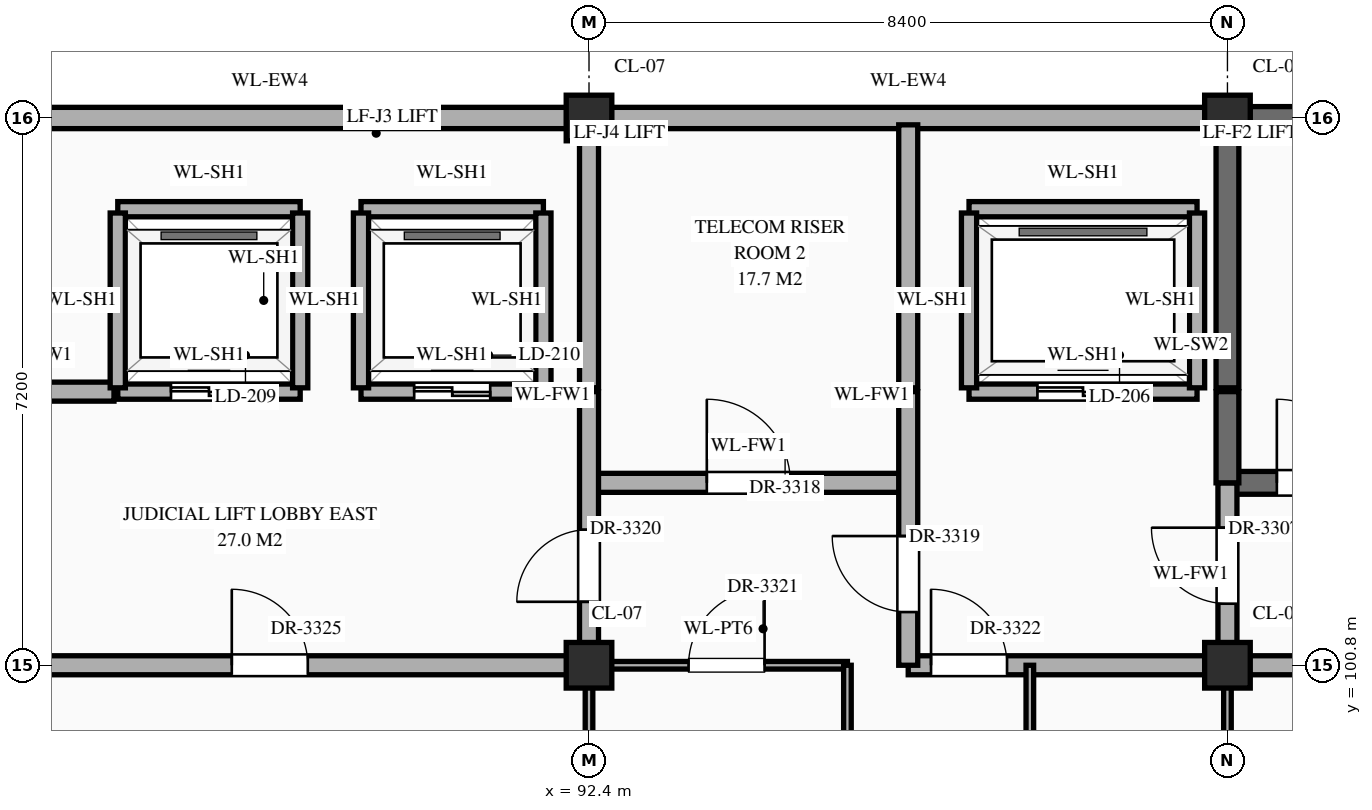
"""IFC4 building model, lengths in metres.
Left out: names, types, materials, properties, quantities, classifications, styles, units other than length and angle.
Written with IfcOpenShell. Run it as: python <this file> out.ifc"""

import sys

from ifc_helpers import new_model, si_unit, direction, frame, frame_2d, origin, origin_2d, place, context, subcontext, project, spatial, rectangle, extrude, element, fill, save


model = new_model("IFC4")
c1 = context("Model", 3, precision=1e-05, world=origin(), true_north=direction((0.0, 1.0)))
c2 = subcontext(c1, "Body", "Model", "MODEL_VIEW")
j1 = project(units=[si_unit("LENGTHUNIT", "METRE"), si_unit("PLANEANGLEUNIT", "RADIAN")], contexts=[c1])
p1 = place(None, origin())
s1 = spatial("IfcSite", under=j1, at=p1, CompositionType="ELEMENT")
p2 = place(p1, origin())
s2 = spatial("IfcBuilding", under=s1, at=p2, CompositionType="ELEMENT")
p3 = place(p2, frame((0.0, 0.0, 64.5)))
s3 = spatial("IfcBuildingStorey", under=s2, at=p3, CompositionType="ELEMENT", Elevation=64.5)
for number, where, z_axis, x_axis in (
    (1, (92.4, 100.8, 0.0), (0.0, 0.0, 1.0), (1.0, 0.0, 0.0)),
    (2, (92.4, 108.0, 0.0), (0.0, 0.0, 1.0), (1.0, 0.0, 0.0)),
    (3, (100.8, 100.8, 0.0), (0.0, 0.0, 1.0), (1.0, 0.0, 0.0)),
    (4, (100.8, 108.0, 0.0), (0.0, 0.0, 1.0), (1.0, 0.0, 0.0)),
):
    element("IfcColumn", number, at=place(p3, frame(where, z_axis=z_axis, x_axis=x_axis)), inside=s3, PredefinedType="COLUMN", context=c2, shape_type="SweptSolid", body=[
        extrude(rectangle(XDim=0.6, YDim=0.6, at=origin_2d()), origin(), (0.0, 0.0, 1.0), 4.2),
    ])
p4 = place(p3, frame((84.295, 108.0, 0.0), z_axis=(0.0, 0.0, 1.0), x_axis=(1.0, 0.0, 0.0)))
e5 = element("IfcWall", 5, at=p4, inside=s3, PredefinedType="STANDARD", context=c2, shape_type="SweptSolid", body=[
    extrude(rectangle(XDim=7.81, YDim=0.28, at=frame_2d((3.905, 0.0))), origin(), (0.0, 0.0, 1.0), 3.3),
])
p5 = place(p3, frame((92.695, 108.0, 0.0), z_axis=(0.0, 0.0, 1.0), x_axis=(1.0, 0.0, 0.0)))
e6 = element("IfcWall", 6, at=p5, inside=s3, PredefinedType="STANDARD", context=c2, shape_type="SweptSolid", body=[
    extrude(rectangle(XDim=7.81, YDim=0.28, at=frame_2d((3.905, 0.0))), origin(), (0.0, 0.0, 1.0), 3.3),
])
p6 = place(p3, frame((101.095, 108.0, 0.0), z_axis=(0.0, 0.0, 1.0), x_axis=(1.0, 0.0, 0.0)))
e7 = element("IfcWall", 7, at=p6, inside=s3, PredefinedType="SHEAR", context=c2, shape_type="SweptSolid", body=[
    extrude(rectangle(XDim=7.81, YDim=0.3, at=frame_2d((3.905, 0.0))), origin(), (0.0, 0.0, 1.0), 3.95),
])
p7 = place(p3, frame((75.6, 100.8, 0.0), z_axis=(0.0, 0.0, 1.0), x_axis=(1.0, 0.0, 0.0)))
e8 = element("IfcWall", 8, at=p7, inside=s3, PredefinedType="STANDARD", context=c2, shape_type="SweptSolid", body=[
    extrude(rectangle(XDim=16.8, YDim=0.25, at=frame_2d((8.4, 0.0))), origin(), (0.0, 0.0, 1.0), 3.1),
])
p8 = place(p7, frame((3.65, 0.0, 0.0)))
e9 = element("IfcOpeningElement", 9, at=p8, cuts=e8, PredefinedType="OPENING", context=c2, shape_type="SweptSolid", body=[
    extrude(rectangle(XDim=1.1, YDim=2.2, at=frame_2d((0.55, 1.1))), frame((0.0, 0.137, 0.0), z_axis=(0.0, -1.0, 0.0), x_axis=(1.0, 0.0, 0.0)), (0.0, 0.0, 1.0), 0.274),
])
p9 = place(p7, frame((12.1, 0.0, 0.0)))
e10 = element("IfcOpeningElement", 10, at=p9, cuts=e8, PredefinedType="OPENING", context=c2, shape_type="SweptSolid", body=[
    extrude(rectangle(XDim=1.0, YDim=2.2, at=frame_2d((0.5, 1.1))), frame((0.0, 0.137, 0.0), z_axis=(0.0, -1.0, 0.0), x_axis=(1.0, 0.0, 0.0)), (0.0, 0.0, 1.0), 0.274),
])
p10 = place(p3, frame((92.4, 100.8, 0.0), z_axis=(0.0, 0.0, 1.0), x_axis=(1.0, 0.0, 0.0)))
e11 = element("IfcWall", 11, at=p10, inside=s3, PredefinedType="STANDARD", context=c2, shape_type="SweptSolid", body=[
    extrude(rectangle(XDim=3.4, YDim=0.1, at=frame_2d((1.7, 0.0))), origin(), (0.0, 0.0, 1.0), 3.1),
])
p11 = place(p10, frame((1.31, 0.0, 0.0)))
e12 = element("IfcOpeningElement", 12, at=p11, cuts=e11, PredefinedType="OPENING", context=c2, shape_type="SweptSolid", body=[
    extrude(rectangle(XDim=1.0, YDim=2.25, at=frame_2d((0.5, 1.125))), frame((0.0, 0.062, 0.0), z_axis=(0.0, -1.0, 0.0), x_axis=(1.0, 0.0, 0.0)), (0.0, 0.0, 1.0), 0.124),
])
p12 = place(p3, frame((96.6, 100.8, 0.0), z_axis=(0.0, 0.0, 1.0), x_axis=(1.0, 0.0, 0.0)))
e13 = element("IfcWall", 13, at=p12, inside=s3, PredefinedType="STANDARD", context=c2, shape_type="SweptSolid", body=[
    extrude(rectangle(XDim=12.56, YDim=0.25, at=frame_2d((6.28, 0.0))), origin(), (0.0, 0.0, 1.0), 3.1),
])
p13 = place(p12, frame((7.925, 0.0, 0.0)))
e14 = element("IfcOpeningElement", 14, at=p13, cuts=e13, PredefinedType="OPENING", context=c2, shape_type="SweptSolid", body=[
    extrude(rectangle(XDim=0.95, YDim=2.15, at=frame_2d((0.475, 1.075))), frame((0.0, 0.137, 0.0), z_axis=(0.0, -1.0, 0.0), x_axis=(1.0, 0.0, 0.0)), (0.0, 0.0, 1.0), 0.274),
])
p14 = place(p12, frame((0.3, 0.0, 0.0)))
e15 = element("IfcOpeningElement", 15, at=p14, cuts=e13, PredefinedType="OPENING", context=c2, shape_type="SweptSolid", body=[
    extrude(rectangle(XDim=1.0, YDim=2.2, at=frame_2d((0.5, 1.1))), frame((0.0, 0.137, 0.0), z_axis=(0.0, -1.0, 0.0), x_axis=(1.0, 0.0, 0.0)), (0.0, 0.0, 1.0), 0.274),
])
p15 = place(p3, frame((92.4, 103.2, 0.0), z_axis=(0.0, 0.0, 1.0), x_axis=(1.0, 0.0, 0.0)))
e16 = element("IfcWall", 16, at=p15, inside=s3, PredefinedType="STANDARD", context=c2, shape_type="SweptSolid", body=[
    extrude(rectangle(XDim=4.2, YDim=0.25, at=frame_2d((2.1, 0.0))), origin(), (0.0, 0.0, 1.0), 3.95),
])
p16 = place(p15, frame((1.55, 0.0, 0.0)))
e17 = element("IfcOpeningElement", 17, at=p16, cuts=e16, PredefinedType="OPENING", context=c2, shape_type="SweptSolid", body=[
    extrude(rectangle(XDim=1.1, YDim=2.2, at=frame_2d((0.55, 1.1))), frame((0.0, 0.137, 0.0), z_axis=(0.0, -1.0, 0.0), x_axis=(1.0, 0.0, 0.0)), (0.0, 0.0, 1.0), 0.274),
])
p17 = place(p3, frame((100.8, 103.2, 0.0), z_axis=(0.0, 0.0, 1.0), x_axis=(1.0, 0.0, 0.0)))
e18 = element("IfcWall", 18, at=p17, inside=s3, PredefinedType="SHEAR", context=c2, shape_type="SweptSolid", body=[
    extrude(rectangle(XDim=8.36, YDim=0.3, at=frame_2d((4.18, 0.0))), origin(), (0.0, 0.0, 1.0), 3.95),
])
p18 = place(p17, frame((0.65, 0.0, 0.0)))
e19 = element("IfcOpeningElement", 19, at=p18, cuts=e18, PredefinedType="OPENING", context=c2, shape_type="SweptSolid", body=[
    extrude(rectangle(XDim=1.1, YDim=2.2, at=frame_2d((0.55, 1.1))), frame((0.0, 0.162, 0.0), z_axis=(0.0, -1.0, 0.0), x_axis=(1.0, 0.0, 0.0)), (0.0, 0.0, 1.0), 0.324),
])
p19 = place(p3, frame((84.05, 104.4, 0.0), z_axis=(0.0, 0.0, 1.0), x_axis=(1.0, 0.0, 0.0)))
e20 = element("IfcWall", 20, at=p19, inside=s3, PredefinedType="STANDARD", context=c2, shape_type="SweptSolid", body=[
    extrude(rectangle(XDim=2.1, YDim=0.25, at=frame_2d((1.05, 0.0))), origin(), (0.0, 0.0, 1.0), 3.95),
])
p20 = place(p3, frame((86.2, 104.4, 0.0), z_axis=(0.0, 0.0, 1.0), x_axis=(1.0, 0.0, 0.0)))
e21 = element("IfcWall", 21, at=p20, inside=s3, PredefinedType="STANDARD", context=c2, shape_type="SweptSolid", body=[
    extrude(rectangle(XDim=2.4, YDim=0.2, at=frame_2d((1.2, 0.0))), origin(), (0.0, 0.0, 1.0), 3.95),
])
p21 = place(p20, frame((0.7, 0.0, 0.0)))
e22 = element("IfcOpeningElement", 22, at=p21, cuts=e21, PredefinedType="OPENING", context=c2, shape_type="SweptSolid", body=[
    extrude(rectangle(XDim=1.0, YDim=2.15, at=frame_2d((0.5, 1.075))), frame((0.0, 0.112, 0.0), z_axis=(0.0, -1.0, 0.0), x_axis=(1.0, 0.0, 0.0)), (0.0, 0.0, 1.0), 0.224),
])
p22 = place(p3, frame((89.4, 104.4, 0.0), z_axis=(0.0, 0.0, 1.0), x_axis=(1.0, 0.0, 0.0)))
e23 = element("IfcWall", 23, at=p22, inside=s3, PredefinedType="STANDARD", context=c2, shape_type="SweptSolid", body=[
    extrude(rectangle(XDim=2.4, YDim=0.2, at=frame_2d((1.2, 0.0))), origin(), (0.0, 0.0, 1.0), 3.95),
])
p23 = place(p22, frame((0.7, 0.0, 0.0)))
e24 = element("IfcOpeningElement", 24, at=p23, cuts=e23, PredefinedType="OPENING", context=c2, shape_type="SweptSolid", body=[
    extrude(rectangle(XDim=1.0, YDim=2.15, at=frame_2d((0.5, 1.075))), frame((0.0, 0.112, 0.0), z_axis=(0.0, -1.0, 0.0), x_axis=(1.0, 0.0, 0.0)), (0.0, 0.0, 1.0), 0.224),
])
p24 = place(p3, frame((97.4, 104.4, 0.0), z_axis=(0.0, 0.0, 1.0), x_axis=(1.0, 0.0, 0.0)))
e25 = element("IfcWall", 25, at=p24, inside=s3, PredefinedType="STANDARD", context=c2, shape_type="SweptSolid", body=[
    extrude(rectangle(XDim=3.0, YDim=0.2, at=frame_2d((1.5, 0.0))), origin(), (0.0, 0.0, 1.0), 3.95),
])
p25 = place(p24, frame((0.9, 0.0, 0.0)))
e26 = element("IfcOpeningElement", 26, at=p25, cuts=e25, PredefinedType="OPENING", context=c2, shape_type="SweptSolid", body=[
    extrude(rectangle(XDim=1.2, YDim=2.15, at=frame_2d((0.6, 1.075))), frame((0.0, 0.112, 0.0), z_axis=(0.0, -1.0, 0.0), x_axis=(1.0, 0.0, 0.0)), (0.0, 0.0, 1.0), 0.224),
])
for number, where, z_axis, x_axis in (
    (27, (86.2, 106.8, 0.0), (0.0, 0.0, 1.0), (1.0, 0.0, 0.0)),
    (28, (89.4, 106.8, 0.0), (0.0, 0.0, 1.0), (1.0, 0.0, 0.0)),
):
    element("IfcWall", number, at=place(p3, frame(where, z_axis=z_axis, x_axis=x_axis)), inside=s3, PredefinedType="STANDARD", context=c2, shape_type="SweptSolid", body=[
        extrude(rectangle(XDim=2.4, YDim=0.2, at=frame_2d((1.2, 0.0))), origin(), (0.0, 0.0, 1.0), 3.95),
    ])
p26 = place(p3, frame((97.4, 106.8, 0.0), z_axis=(0.0, 0.0, 1.0), x_axis=(1.0, 0.0, 0.0)))
e29 = element("IfcWall", 29, at=p26, inside=s3, PredefinedType="STANDARD", context=c2, shape_type="SweptSolid", body=[
    extrude(rectangle(XDim=3.0, YDim=0.2, at=frame_2d((1.5, 0.0))), origin(), (0.0, 0.0, 1.0), 3.95),
])
for number, where, z_axis, x_axis in (
    (30, (86.2, 104.45, 0.0), (0.0, 0.0, 1.0), (0.0, 1.0, 0.0)),
    (31, (88.6, 104.45, 0.0), (0.0, 0.0, 1.0), (0.0, 1.0, 0.0)),
    (32, (89.4, 104.45, 0.0), (0.0, 0.0, 1.0), (0.0, 1.0, 0.0)),
    (33, (91.8, 104.45, 0.0), (0.0, 0.0, 1.0), (0.0, 1.0, 0.0)),
):
    element("IfcWall", number, at=place(p3, frame(where, z_axis=z_axis, x_axis=x_axis)), inside=s3, PredefinedType="STANDARD", context=c2, shape_type="SweptSolid", body=[
        extrude(rectangle(XDim=2.3, YDim=0.2, at=frame_2d((1.15, 0.0))), origin(), (0.0, 0.0, 1.0), 3.95),
    ])
p27 = place(p3, frame((92.4, 95.35, 0.0), z_axis=(0.0, 0.0, 1.0), x_axis=(0.0, 1.0, 0.0)))
e34 = element("IfcWall", 34, at=p27, inside=s3, PredefinedType="STANDARD", context=c2, shape_type="SweptSolid", body=[
    extrude(rectangle(XDim=5.45, YDim=0.1, at=frame_2d((2.725, 0.0))), origin(), (0.0, 0.0, 1.0), 3.2),
])
p28 = place(p3, frame((92.4, 100.8, 0.0), z_axis=(0.0, 0.0, 1.0), x_axis=(0.0, 1.0, 0.0)))
e35 = element("IfcWall", 35, at=p28, inside=s3, PredefinedType="STANDARD", context=c2, shape_type="SweptSolid", body=[
    extrude(rectangle(XDim=3.6, YDim=0.25, at=frame_2d((1.8, 0.0))), origin(), (0.0, 0.0, 1.0), 3.2),
])
p29 = place(p28, frame((0.835, 0.0, 0.0)))
e36 = element("IfcOpeningElement", 36, at=p29, cuts=e35, PredefinedType="OPENING", context=c2, shape_type="SweptSolid", body=[
    extrude(rectangle(XDim=0.95, YDim=2.15, at=frame_2d((0.475, 1.075))), frame((0.0, 0.137, 0.0), z_axis=(0.0, -1.0, 0.0), x_axis=(1.0, 0.0, 0.0)), (0.0, 0.0, 1.0), 0.274),
])
p30 = place(p3, frame((92.4, 104.45, 0.0), z_axis=(0.0, 0.0, 1.0), x_axis=(0.0, 1.0, 0.0)))
e37 = element("IfcWall", 37, at=p30, inside=s3, PredefinedType="STANDARD", context=c2, shape_type="SweptSolid", body=[
    extrude(rectangle(XDim=3.46, YDim=0.25, at=frame_2d((1.73, 0.0))), origin(), (0.0, 0.0, 1.0), 3.2),
])
p31 = place(p3, frame((95.8, 95.35, 0.0), z_axis=(0.0, 0.0, 1.0), x_axis=(0.0, 1.0, 0.0)))
e38 = element("IfcWall", 38, at=p31, inside=s3, PredefinedType="STANDARD", context=c2, shape_type="SweptSolid", body=[
    extrude(rectangle(XDim=5.45, YDim=0.1, at=frame_2d((2.725, 0.0))), origin(), (0.0, 0.0, 1.0), 3.95),
])
p32 = place(p31, frame((2.295, 0.0, 0.0)))
e39 = element("IfcOpeningElement", 39, at=p32, cuts=e38, PredefinedType="OPENING", context=c2, shape_type="SweptSolid", body=[
    extrude(rectangle(XDim=0.86, YDim=2.1, at=frame_2d((0.43, 1.05))), frame((0.0, 0.062, 0.0), z_axis=(0.0, -1.0, 0.0), x_axis=(1.0, 0.0, 0.0)), (0.0, 0.0, 1.0), 0.124),
])
p33 = place(p3, frame((96.6, 100.8, 0.0), z_axis=(0.0, 0.0, 1.0), x_axis=(0.0, 1.0, 0.0)))
e40 = element("IfcWall", 40, at=p33, inside=s3, PredefinedType="STANDARD", context=c2, shape_type="SweptSolid", body=[
    extrude(rectangle(XDim=3.6, YDim=0.25, at=frame_2d((1.8, 0.0))), origin(), (0.0, 0.0, 1.0), 3.95),
])
p34 = place(p33, frame((0.7, 0.0, 0.0)))
e41 = element("IfcOpeningElement", 41, at=p34, cuts=e40, PredefinedType="OPENING", context=c2, shape_type="SweptSolid", body=[
    extrude(rectangle(XDim=1.0, YDim=2.2, at=frame_2d((0.5, 1.1))), frame((0.0, 0.137, 0.0), z_axis=(0.0, -1.0, 0.0), x_axis=(1.0, 0.0, 0.0)), (0.0, 0.0, 1.0), 0.274),
])
p35 = place(p3, frame((96.6, 104.45, 0.0), z_axis=(0.0, 0.0, 1.0), x_axis=(0.0, 1.0, 0.0)))
e42 = element("IfcWall", 42, at=p35, inside=s3, PredefinedType="STANDARD", context=c2, shape_type="SweptSolid", body=[
    extrude(rectangle(XDim=3.46, YDim=0.25, at=frame_2d((1.73, 0.0))), origin(), (0.0, 0.0, 1.0), 3.95),
])
p36 = place(p3, frame((97.4, 104.45, 0.0), z_axis=(0.0, 0.0, 1.0), x_axis=(0.0, 1.0, 0.0)))
e43 = element("IfcWall", 43, at=p36, inside=s3, PredefinedType="STANDARD", context=c2, shape_type="SweptSolid", body=[
    extrude(rectangle(XDim=2.3, YDim=0.2, at=frame_2d((1.15, 0.0))), origin(), (0.0, 0.0, 1.0), 3.95),
])
p37 = place(p3, frame((98.2, 95.35, 0.0), z_axis=(0.0, 0.0, 1.0), x_axis=(0.0, 1.0, 0.0)))
e44 = element("IfcWall", 44, at=p37, inside=s3, PredefinedType="STANDARD", context=c2, shape_type="SweptSolid", body=[
    extrude(rectangle(XDim=5.45, YDim=0.1, at=frame_2d((2.725, 0.0))), origin(), (0.0, 0.0, 1.0), 3.95),
])
p38 = place(p37, frame((2.265, 0.0, 0.0)))
e45 = element("IfcOpeningElement", 45, at=p38, cuts=e44, PredefinedType="OPENING", context=c2, shape_type="SweptSolid", body=[
    extrude(rectangle(XDim=0.92, YDim=2.15, at=frame_2d((0.46, 1.075))), frame((0.0, 0.062, 0.0), z_axis=(0.0, -1.0, 0.0), x_axis=(1.0, 0.0, 0.0)), (0.0, 0.0, 1.0), 0.124),
])
p39 = place(p3, frame((100.4, 104.45, 0.0), z_axis=(0.0, 0.0, 1.0), x_axis=(0.0, 1.0, 0.0)))
e46 = element("IfcWall", 46, at=p39, inside=s3, PredefinedType="STANDARD", context=c2, shape_type="SweptSolid", body=[
    extrude(rectangle(XDim=2.3, YDim=0.2, at=frame_2d((1.15, 0.0))), origin(), (0.0, 0.0, 1.0), 3.95),
])
p40 = place(p3, frame((100.8, 95.35, 0.0), z_axis=(0.0, 0.0, 1.0), x_axis=(0.0, 1.0, 0.0)))
e47 = element("IfcWall", 47, at=p40, inside=s3, PredefinedType="STANDARD", context=c2, shape_type="SweptSolid", body=[
    extrude(rectangle(XDim=5.45, YDim=0.1, at=frame_2d((2.725, 0.0))), origin(), (0.0, 0.0, 1.0), 3.2),
])
p41 = place(p3, frame((100.8, 100.8, 0.0), z_axis=(0.0, 0.0, 1.0), x_axis=(0.0, 1.0, 0.0)))
e48 = element("IfcWall", 48, at=p41, inside=s3, PredefinedType="STANDARD", context=c2, shape_type="SweptSolid", body=[
    extrude(rectangle(XDim=2.4, YDim=0.25, at=frame_2d((1.2, 0.0))), origin(), (0.0, 0.0, 1.0), 3.2),
])
p42 = place(p41, frame((0.81, 0.0, 0.0)))
e49 = element("IfcOpeningElement", 49, at=p42, cuts=e48, PredefinedType="OPENING", context=c2, shape_type="SweptSolid", body=[
    extrude(rectangle(XDim=1.0, YDim=2.2, at=frame_2d((0.5, 1.1))), frame((0.0, 0.137, 0.0), z_axis=(0.0, -1.0, 0.0), x_axis=(1.0, 0.0, 0.0)), (0.0, 0.0, 1.0), 0.274),
])
p43 = place(p3, frame((100.8, 103.2, 0.0), z_axis=(0.0, 0.0, 1.0), x_axis=(0.0, 1.0, 0.0)))
e50 = element("IfcWall", 50, at=p43, inside=s3, PredefinedType="SHEAR", context=c2, shape_type="SweptSolid", body=[
    extrude(rectangle(XDim=1.2, YDim=0.3, at=frame_2d((0.6, 0.0))), origin(), (0.0, 0.0, 1.0), 3.95),
])
p44 = place(p3, frame((100.8, 104.45, 0.0), z_axis=(0.0, 0.0, 1.0), x_axis=(0.0, 1.0, 0.0)))
e51 = element("IfcWall", 51, at=p44, inside=s3, PredefinedType="SHEAR", context=c2, shape_type="SweptSolid", body=[
    extrude(rectangle(XDim=3.46, YDim=0.3, at=frame_2d((1.73, 0.0))), origin(), (0.0, 0.0, 1.0), 3.95),
])
p45 = place(p25, origin())
e52 = element("IfcDoor", 52, at=p45, inside=s3, OperationType="DOUBLE_DOOR_SLIDING", PredefinedType="DOOR", context=c2, shape_type="SweptSolid", body=[
    extrude(rectangle(XDim=1.2, YDim=2.15, at=frame_2d((0.6, 1.075))), frame((0.0, 0.025, 0.0), z_axis=(0.0, -1.0, 0.0), x_axis=(1.0, 0.0, 0.0)), (0.0, 0.0, 1.0), 0.05),
])
fill(e26, e52)
p46 = place(p21, origin())
e53 = element("IfcDoor", 53, at=p46, inside=s3, OperationType="DOUBLE_DOOR_SLIDING", PredefinedType="DOOR", context=c2, shape_type="SweptSolid", body=[
    extrude(rectangle(XDim=1.0, YDim=2.15, at=frame_2d((0.5, 1.075))), frame((0.0, 0.025, 0.0), z_axis=(0.0, -1.0, 0.0), x_axis=(1.0, 0.0, 0.0)), (0.0, 0.0, 1.0), 0.05),
])
fill(e22, e53)
p47 = place(p23, origin())
e54 = element("IfcDoor", 54, at=p47, inside=s3, OperationType="DOUBLE_DOOR_SLIDING", PredefinedType="DOOR", context=c2, shape_type="SweptSolid", body=[
    extrude(rectangle(XDim=1.0, YDim=2.15, at=frame_2d((0.5, 1.075))), frame((0.0, 0.025, 0.0), z_axis=(0.0, -1.0, 0.0), x_axis=(1.0, 0.0, 0.0)), (0.0, 0.0, 1.0), 0.05),
])
fill(e24, e54)
p48 = place(p18, origin())
e55 = element("IfcDoor", 55, at=p48, inside=s3, OperationType="SINGLE_SWING_LEFT", PredefinedType="DOOR", context=c2, shape_type="SweptSolid", body=[
    extrude(rectangle(XDim=1.1, YDim=2.2, at=frame_2d((0.55, 1.1))), frame((0.0, 0.025, 0.0), z_axis=(0.0, -1.0, 0.0), x_axis=(1.0, 0.0, 0.0)), (0.0, 0.0, 1.0), 0.05),
])
fill(e19, e55)
p49 = place(p42, origin())
e56 = element("IfcDoor", 56, at=p49, inside=s3, OperationType="SINGLE_SWING_RIGHT", PredefinedType="DOOR", context=c2, shape_type="SweptSolid", body=[
    extrude(rectangle(XDim=1.0, YDim=2.2, at=frame_2d((0.5, 1.1))), frame((0.0, 0.025, 0.0), z_axis=(0.0, -1.0, 0.0), x_axis=(1.0, 0.0, 0.0)), (0.0, 0.0, 1.0), 0.05),
])
fill(e49, e56)
p50 = place(p16, origin())
e57 = element("IfcDoor", 57, at=p50, inside=s3, OperationType="SINGLE_SWING_LEFT", PredefinedType="DOOR", context=c2, shape_type="SweptSolid", body=[
    extrude(rectangle(XDim=1.1, YDim=2.2, at=frame_2d((0.55, 1.1))), frame((0.0, 0.025, 0.0), z_axis=(0.0, -1.0, 0.0), x_axis=(1.0, 0.0, 0.0)), (0.0, 0.0, 1.0), 0.05),
])
fill(e17, e57)
p51 = place(p34, origin())
e58 = element("IfcDoor", 58, at=p51, inside=s3, OperationType="SINGLE_SWING_RIGHT", PredefinedType="DOOR", context=c2, shape_type="SweptSolid", body=[
    extrude(rectangle(XDim=1.0, YDim=2.2, at=frame_2d((0.5, 1.1))), frame((0.0, 0.025, 0.0), z_axis=(0.0, -1.0, 0.0), x_axis=(1.0, 0.0, 0.0)), (0.0, 0.0, 1.0), 0.05),
])
fill(e41, e58)
p52 = place(p29, origin())
e59 = element("IfcDoor", 59, at=p52, inside=s3, OperationType="SINGLE_SWING_LEFT", PredefinedType="DOOR", context=c2, shape_type="SweptSolid", body=[
    extrude(rectangle(XDim=0.95, YDim=2.15, at=frame_2d((0.475, 1.075))), frame((0.0, 0.025, 0.0), z_axis=(0.0, -1.0, 0.0), x_axis=(1.0, 0.0, 0.0)), (0.0, 0.0, 1.0), 0.05),
])
fill(e36, e59)
p53 = place(p11, origin())
e60 = element("IfcDoor", 60, at=p53, inside=s3, OperationType="SINGLE_SWING_RIGHT", PredefinedType="DOOR", context=c2, shape_type="SweptSolid", body=[
    extrude(rectangle(XDim=1.0, YDim=2.25, at=frame_2d((0.5, 1.125))), frame((0.0, 0.025, 0.0), z_axis=(0.0, -1.0, 0.0), x_axis=(1.0, 0.0, 0.0)), (0.0, 0.0, 1.0), 0.05),
])
fill(e12, e60)
p54 = place(p14, origin())
e61 = element("IfcDoor", 61, at=p54, inside=s3, OperationType="SINGLE_SWING_LEFT", PredefinedType="DOOR", context=c2, shape_type="SweptSolid", body=[
    extrude(rectangle(XDim=1.0, YDim=2.2, at=frame_2d((0.5, 1.1))), frame((0.0, 0.025, 0.0), z_axis=(0.0, -1.0, 0.0), x_axis=(1.0, 0.0, 0.0)), (0.0, 0.0, 1.0), 0.05),
])
fill(e15, e61)
p55 = place(p9, origin())
e62 = element("IfcDoor", 62, at=p55, inside=s3, OperationType="SINGLE_SWING_LEFT", PredefinedType="DOOR", context=c2, shape_type="SweptSolid", body=[
    extrude(rectangle(XDim=1.0, YDim=2.2, at=frame_2d((0.5, 1.1))), frame((0.0, 0.025, 0.0), z_axis=(0.0, -1.0, 0.0), x_axis=(1.0, 0.0, 0.0)), (0.0, 0.0, 1.0), 0.05),
])
fill(e10, e62)
save(model, sys.argv[1])
